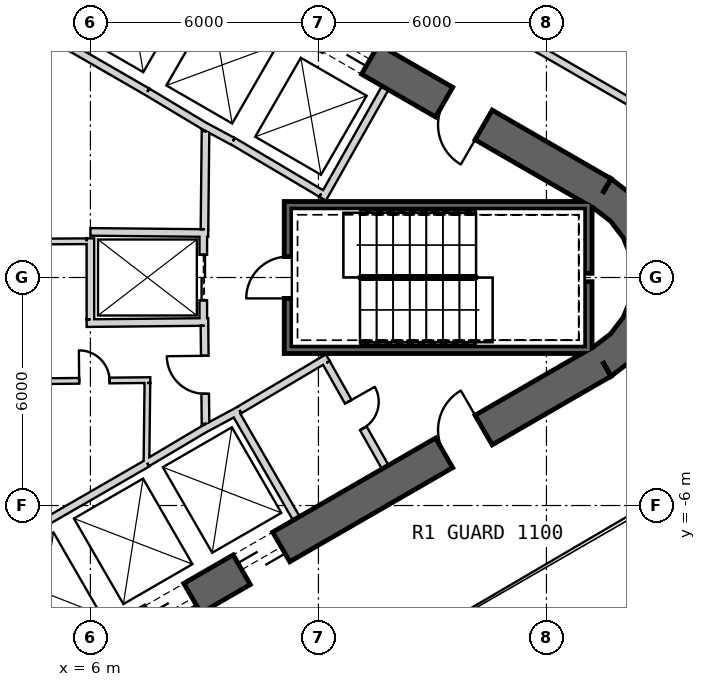
"""IFC4 building model, lengths in metres.
Left out: names, types, materials, properties, quantities, classifications, styles, units other than length and angle.
Written with IfcOpenShell. Run it as: python <this file> out.ifc"""

import sys

from ifc_helpers import new_model, si_unit, direction, frame, frame_2d, origin, place, context, subcontext, project, spatial, polyline, rectangle, outline, extrude, element, fill, save


model = new_model("IFC4")
c1 = context("Model", 3, precision=1e-05, world=origin(), true_north=direction((0.0, 1.0)))
c2 = subcontext(c1, "Body", "Model", "MODEL_VIEW")
j1 = project(units=[si_unit("LENGTHUNIT", "METRE"), si_unit("PLANEANGLEUNIT", "RADIAN")], contexts=[c1])
p1 = place(None, origin())
s1 = spatial("IfcSite", under=j1, at=p1, CompositionType="ELEMENT")
p2 = place(p1, origin())
s2 = spatial("IfcBuilding", under=s1, at=p2, CompositionType="ELEMENT")
p3 = place(p2, frame((0.0, 0.0, 15.5)))
s3 = spatial("IfcBuildingStorey", under=s2, at=p3, CompositionType="ELEMENT", Elevation=15.5)
p4 = place(p3, frame((19.475, 2.208, 0.0), z_axis=(0.0, 0.0, 1.0), x_axis=(-0.866028369851, 0.499994862586, 0.0)))
e1 = element("IfcWall", 1, at=p4, inside=s3, PredefinedType="SHEAR", context=c2, shape_type="SweptSolid", body=[
    extrude(rectangle(XDim=31.523, YDim=0.9, at=frame_2d((15.762, 0.0))), origin(), (0.0, 0.0, 1.0), 6.0),
])
p5 = place(p4, frame((7.062, 0.0, 0.0)))
e2 = element("IfcOpeningElement", 2, at=p5, cuts=e1, PredefinedType="OPENING", context=c2, shape_type="SweptSolid", body=[
    extrude(rectangle(XDim=1.2, YDim=2.4, at=frame_2d((0.6, 1.2))), frame((0.0, 0.46, 0.0), z_axis=(0.0, -1.0, 0.0), x_axis=(1.0, 0.0, 0.0)), (0.0, 0.0, 1.0), 0.92),
])
p6 = place(p4, frame((9.762, 0.0, 0.0)))
e3 = element("IfcOpeningElement", 3, at=p6, cuts=e1, PredefinedType="OPENING", context=c2, shape_type="SweptSolid", body=[
    extrude(rectangle(XDim=1.2, YDim=2.4, at=frame_2d((0.6, 1.2))), frame((0.0, 0.46, 0.0), z_axis=(0.0, -1.0, 0.0), x_axis=(1.0, 0.0, 0.0)), (0.0, 0.0, 1.0), 0.92),
])
p7 = place(p4, frame((12.462, 0.0, 0.0)))
e4 = element("IfcOpeningElement", 4, at=p7, cuts=e1, PredefinedType="OPENING", context=c2, shape_type="SweptSolid", body=[
    extrude(rectangle(XDim=1.2, YDim=2.4, at=frame_2d((0.6, 1.2))), frame((0.0, 0.46, 0.0), z_axis=(0.0, -1.0, 0.0), x_axis=(1.0, 0.0, 0.0)), (0.0, 0.0, 1.0), 0.92),
])
p8 = place(p4, frame((15.162, 0.0, 0.0)))
e5 = element("IfcOpeningElement", 5, at=p8, cuts=e1, PredefinedType="OPENING", context=c2, shape_type="SweptSolid", body=[
    extrude(rectangle(XDim=1.2, YDim=2.4, at=frame_2d((0.6, 1.2))), frame((0.0, 0.46, 0.0), z_axis=(0.0, -1.0, 0.0), x_axis=(1.0, 0.0, 0.0)), (0.0, 0.0, 1.0), 0.92),
])
p9 = place(p4, frame((17.862, 0.0, 0.0)))
e6 = element("IfcOpeningElement", 6, at=p9, cuts=e1, PredefinedType="OPENING", context=c2, shape_type="SweptSolid", body=[
    extrude(rectangle(XDim=1.2, YDim=2.4, at=frame_2d((0.6, 1.2))), frame((0.0, 0.46, 0.0), z_axis=(0.0, -1.0, 0.0), x_axis=(1.0, 0.0, 0.0)), (0.0, 0.0, 1.0), 0.92),
])
p10 = place(p4, frame((20.562, 0.0, 0.0)))
e7 = element("IfcOpeningElement", 7, at=p10, cuts=e1, PredefinedType="OPENING", context=c2, shape_type="SweptSolid", body=[
    extrude(rectangle(XDim=1.2, YDim=2.4, at=frame_2d((0.6, 1.2))), frame((0.0, 0.46, 0.0), z_axis=(0.0, -1.0, 0.0), x_axis=(1.0, 0.0, 0.0)), (0.0, 0.0, 1.0), 0.92),
])
p11 = place(p4, frame((23.262, 0.0, 0.0)))
e8 = element("IfcOpeningElement", 8, at=p11, cuts=e1, PredefinedType="OPENING", context=c2, shape_type="SweptSolid", body=[
    extrude(rectangle(XDim=1.2, YDim=2.4, at=frame_2d((0.6, 1.2))), frame((0.0, 0.46, 0.0), z_axis=(0.0, -1.0, 0.0), x_axis=(1.0, 0.0, 0.0)), (0.0, 0.0, 1.0), 0.92),
])
p12 = place(p4, frame((3.612, 0.0, 0.0)))
e9 = element("IfcOpeningElement", 9, at=p12, cuts=e1, PredefinedType="OPENING", context=c2, shape_type="SweptSolid", body=[
    extrude(rectangle(XDim=1.2, YDim=2.4, at=frame_2d((0.6, 1.2))), frame((0.0, 0.46, 0.0), z_axis=(0.0, -1.0, 0.0), x_axis=(1.0, 0.0, 0.0)), (0.0, 0.0, 1.0), 0.92),
])
p13 = place(p4, frame((26.712, 0.0, 0.0)))
e10 = element("IfcOpeningElement", 10, at=p13, cuts=e1, PredefinedType="OPENING", context=c2, shape_type="SweptSolid", body=[
    extrude(rectangle(XDim=1.2, YDim=2.4, at=frame_2d((0.6, 1.2))), frame((0.0, 0.46, 0.0), z_axis=(0.0, -1.0, 0.0), x_axis=(1.0, 0.0, 0.0)), (0.0, 0.0, 1.0), 0.92),
])
p14 = place(p3, frame((-7.825, -17.97, 0.0), z_axis=(0.0, 0.0, 1.0), x_axis=(0.866028369851, 0.499994862586, 0.0)))
e11 = element("IfcWall", 11, at=p14, inside=s3, PredefinedType="SHEAR", context=c2, shape_type="SweptSolid", body=[
    extrude(rectangle(XDim=31.523, YDim=0.9, at=frame_2d((15.762, 0.0))), origin(), (0.0, 0.0, 1.0), 6.0),
])
p15 = place(p14, frame((7.062, 0.0, 0.0)))
e12 = element("IfcOpeningElement", 12, at=p15, cuts=e11, PredefinedType="OPENING", context=c2, shape_type="SweptSolid", body=[
    extrude(rectangle(XDim=1.2, YDim=2.4, at=frame_2d((0.6, 1.2))), frame((0.0, 0.46, 0.0), z_axis=(0.0, -1.0, 0.0), x_axis=(1.0, 0.0, 0.0)), (0.0, 0.0, 1.0), 0.92),
])
p16 = place(p14, frame((9.762, 0.0, 0.0)))
e13 = element("IfcOpeningElement", 13, at=p16, cuts=e11, PredefinedType="OPENING", context=c2, shape_type="SweptSolid", body=[
    extrude(rectangle(XDim=1.2, YDim=2.4, at=frame_2d((0.6, 1.2))), frame((0.0, 0.46, 0.0), z_axis=(0.0, -1.0, 0.0), x_axis=(1.0, 0.0, 0.0)), (0.0, 0.0, 1.0), 0.92),
])
p17 = place(p14, frame((12.462, 0.0, 0.0)))
e14 = element("IfcOpeningElement", 14, at=p17, cuts=e11, PredefinedType="OPENING", context=c2, shape_type="SweptSolid", body=[
    extrude(rectangle(XDim=1.2, YDim=2.4, at=frame_2d((0.6, 1.2))), frame((0.0, 0.46, 0.0), z_axis=(0.0, -1.0, 0.0), x_axis=(1.0, 0.0, 0.0)), (0.0, 0.0, 1.0), 0.92),
])
p18 = place(p14, frame((15.162, 0.0, 0.0)))
e15 = element("IfcOpeningElement", 15, at=p18, cuts=e11, PredefinedType="OPENING", context=c2, shape_type="SweptSolid", body=[
    extrude(rectangle(XDim=1.2, YDim=2.4, at=frame_2d((0.6, 1.2))), frame((0.0, 0.46, 0.0), z_axis=(0.0, -1.0, 0.0), x_axis=(1.0, 0.0, 0.0)), (0.0, 0.0, 1.0), 0.92),
])
p19 = place(p14, frame((17.862, 0.0, 0.0)))
e16 = element("IfcOpeningElement", 16, at=p19, cuts=e11, PredefinedType="OPENING", context=c2, shape_type="SweptSolid", body=[
    extrude(rectangle(XDim=1.2, YDim=2.4, at=frame_2d((0.6, 1.2))), frame((0.0, 0.46, 0.0), z_axis=(0.0, -1.0, 0.0), x_axis=(1.0, 0.0, 0.0)), (0.0, 0.0, 1.0), 0.92),
])
p20 = place(p14, frame((20.562, 0.0, 0.0)))
e17 = element("IfcOpeningElement", 17, at=p20, cuts=e11, PredefinedType="OPENING", context=c2, shape_type="SweptSolid", body=[
    extrude(rectangle(XDim=1.2, YDim=2.4, at=frame_2d((0.6, 1.2))), frame((0.0, 0.46, 0.0), z_axis=(0.0, -1.0, 0.0), x_axis=(1.0, 0.0, 0.0)), (0.0, 0.0, 1.0), 0.92),
])
p21 = place(p14, frame((26.712, 0.0, 0.0)))
e18 = element("IfcOpeningElement", 18, at=p21, cuts=e11, PredefinedType="OPENING", context=c2, shape_type="SweptSolid", body=[
    extrude(rectangle(XDim=1.2, YDim=2.4, at=frame_2d((0.6, 1.2))), frame((0.0, 0.46, 0.0), z_axis=(0.0, -1.0, 0.0), x_axis=(1.0, 0.0, 0.0)), (0.0, 0.0, 1.0), 0.92),
])
p22 = place(p14, frame((3.612, 0.0, 0.0)))
e19 = element("IfcOpeningElement", 19, at=p22, cuts=e11, PredefinedType="OPENING", context=c2, shape_type="SweptSolid", body=[
    extrude(rectangle(XDim=1.2, YDim=2.4, at=frame_2d((0.6, 1.2))), frame((0.0, 0.46, 0.0), z_axis=(0.0, -1.0, 0.0), x_axis=(1.0, 0.0, 0.0)), (0.0, 0.0, 1.0), 0.92),
])
p23 = place(p3, origin())
e20 = element("IfcWall", 20, at=p23, inside=s3, PredefinedType="SHEAR", context=c2, shape_type="SweptSolid", body=[
    extrude(outline(polyline([(19.7, -2.598), (20.321, -2.121), (20.798, -1.5), (21.098, -0.777), (21.2, 0.0), (21.098, 0.777), (20.798, 1.5), (20.321, 2.121), (19.7, 2.598), (19.25, 1.819), (19.685, 1.485), (20.019, 1.05), (20.229, 0.543), (20.3, 0.0), (20.229, -0.543), (20.019, -1.05), (19.685, -1.485), (19.25, -1.819), (19.7, -2.598)])), origin(), (0.0, 0.0, 1.0), 6.0),
])
p24 = place(p3, frame((7.497, 4.886, 0.0), z_axis=(0.0, 0.0, 1.0), x_axis=(-0.866030989016, 0.499990325971, 0.0)))
e21 = element("IfcWall", 21, at=p24, inside=s3, PredefinedType="PLUMBINGWALL", context=c2, shape_type="SweptSolid", body=[
    extrude(rectangle(XDim=8.1, YDim=0.2, at=frame_2d((4.05, 0.0))), origin(), (0.0, 0.0, 1.0), 5.7),
])
p25 = place(p3, frame((12.11, 2.073, 0.0), z_axis=(0.0, 0.0, 1.0), x_axis=(0.49196600604, 0.870614408852, 0.0)))
e22 = element("IfcWall", 22, at=p25, inside=s3, PredefinedType="PLUMBINGWALL", context=c2, shape_type="SweptSolid", body=[
    extrude(rectangle(XDim=3.35, YDim=0.2, at=frame_2d((1.675, 0.0))), origin(), (0.0, 0.0, 1.0), 5.7),
])
p26 = place(p3, frame((12.073, 2.211, 0.0), z_axis=(0.0, 0.0, 1.0), x_axis=(-0.860438357912, 0.509554542943, 0.0)))
e23 = element("IfcWall", 23, at=p26, inside=s3, PredefinedType="PLUMBINGWALL", context=c2, shape_type="SweptSolid", body=[
    extrude(rectangle(XDim=2.7, YDim=0.2, at=frame_2d((1.35, 0.0))), origin(), (0.0, 0.0, 1.0), 5.7),
])
p27 = place(p3, frame((9.748, 3.583, 0.0), z_axis=(0.0, 0.0, 1.0), x_axis=(-0.880917147855, 0.473270513147, 0.0)))
e24 = element("IfcWall", 24, at=p27, inside=s3, PredefinedType="PLUMBINGWALL", context=c2, shape_type="SweptSolid", body=[
    extrude(rectangle(XDim=0.878, YDim=0.2, at=frame_2d((0.439, 0.0))), origin(), (0.0, 0.0, 1.0), 5.7),
])
p28 = place(p3, frame((9.079, 3.937, 0.0), z_axis=(0.0, 0.0, 1.0), x_axis=(-0.857516281273, 0.51445682749, 0.0)))
e25 = element("IfcWall", 25, at=p28, inside=s3, PredefinedType="PLUMBINGWALL", context=c2, shape_type="SweptSolid", body=[
    extrude(rectangle(XDim=1.845, YDim=0.2, at=frame_2d((0.922, 0.0))), origin(), (0.0, 0.0, 1.0), 5.7),
])
p29 = place(p3, frame((0.483, -8.936, 0.0), z_axis=(0.0, 0.0, 1.0), x_axis=(0.866030989016, 0.499990325971, 0.0)))
e26 = element("IfcWall", 26, at=p29, inside=s3, PredefinedType="PLUMBINGWALL", context=c2, shape_type="SweptSolid", body=[
    extrude(rectangle(XDim=8.1, YDim=0.2, at=frame_2d((4.05, 0.0))), origin(), (0.0, 0.0, 1.0), 5.7),
])
p30 = place(p3, frame((9.795, -3.525, 0.0), z_axis=(0.0, 0.0, 1.0), x_axis=(0.499984717929, -0.866034226713, 0.0)))
e27 = element("IfcWall", 27, at=p30, inside=s3, PredefinedType="PLUMBINGWALL", context=c2, shape_type="SweptSolid", body=[
    extrude(rectangle(XDim=3.25, YDim=0.2, at=frame_2d((1.625, 0.0))), origin(), (0.0, 0.0, 1.0), 5.7),
])
p31 = place(p3, frame((8.974, -3.999, 0.0), z_axis=(0.0, 0.0, 1.0), x_axis=(0.880907015104, 0.473289373154, 0.0)))
e28 = element("IfcWall", 28, at=p31, inside=s3, PredefinedType="PLUMBINGWALL", context=c2, shape_type="SweptSolid", body=[
    extrude(rectangle(XDim=1.078, YDim=0.2, at=frame_2d((0.539, 0.0))), origin(), (0.0, 0.0, 1.0), 5.7),
])
p32 = place(p3, frame((7.493, -4.878, 0.0), z_axis=(0.0, 0.0, 1.0), x_axis=(0.859981807212, 0.510324691999, 0.0)))
e29 = element("IfcWall", 29, at=p32, inside=s3, PredefinedType="PLUMBINGWALL", context=c2, shape_type="SweptSolid", body=[
    extrude(rectangle(XDim=1.845, YDim=0.2, at=frame_2d((0.922, 0.0))), origin(), (0.0, 0.0, 1.0), 5.7),
])
p33 = place(p3, frame((19.2, 1.9, -0.3), z_axis=(0.0, 0.0, 1.0), x_axis=(-1.0, 0.0, 0.0)))
e30 = element("IfcWall", 30, at=p33, inside=s3, PredefinedType="SHEAR", context=c2, shape_type="SweptSolid", body=[
    extrude(rectangle(XDim=8.1, YDim=0.2, at=frame_2d((4.05, 0.0))), origin(), (0.0, 0.0, 1.0), 6.0),
])
p34 = place(p3, frame((19.1, -2.0, -0.3), z_axis=(0.0, 0.0, 1.0), x_axis=(0.0, 1.0, 0.0)))
e31 = element("IfcWall", 31, at=p34, inside=s3, PredefinedType="SHEAR", context=c2, shape_type="SweptSolid", body=[
    extrude(rectangle(XDim=1.89, YDim=0.2, at=frame_2d((0.945, 0.0))), origin(), (0.0, 0.0, 1.0), 6.0),
])
p35 = place(p3, frame((19.1, 0.11, -0.3), z_axis=(0.0, 0.0, 1.0), x_axis=(0.0, 1.0, 0.0)))
e32 = element("IfcWall", 32, at=p35, inside=s3, PredefinedType="SHEAR", context=c2, shape_type="SweptSolid", body=[
    extrude(rectangle(XDim=1.69, YDim=0.2, at=frame_2d((0.845, 0.0))), origin(), (0.0, 0.0, 1.0), 6.0),
])
p36 = place(p3, frame((11.1, -1.9, -0.3), z_axis=(0.0, 0.0, 1.0), x_axis=(1.0, 0.0, 0.0)))
e33 = element("IfcWall", 33, at=p36, inside=s3, PredefinedType="SHEAR", context=c2, shape_type="SweptSolid", body=[
    extrude(rectangle(XDim=7.9, YDim=0.2, at=frame_2d((3.95, 0.0))), origin(), (0.0, 0.0, 1.0), 6.0),
])
p37 = place(p3, frame((11.2, -1.8, -0.3), z_axis=(0.0, 0.0, 1.0), x_axis=(0.0, 1.0, 0.0)))
e34 = element("IfcWall", 34, at=p37, inside=s3, PredefinedType="SHEAR", context=c2, shape_type="SweptSolid", body=[
    extrude(rectangle(XDim=3.6, YDim=0.2, at=frame_2d((1.8, 0.0))), origin(), (0.0, 0.0, 1.0), 6.0),
])
p38 = place(p37, frame((1.25, 0.0, 0.3)))
e35 = element("IfcOpeningElement", 35, at=p38, cuts=e34, PredefinedType="OPENING", context=c2, shape_type="SweptSolid", body=[
    extrude(rectangle(XDim=1.1, YDim=2.1, at=frame_2d((0.55, 1.05))), frame((0.0, 0.11, 0.0), z_axis=(0.0, -1.0, 0.0), x_axis=(1.0, 0.0, 0.0)), (0.0, 0.0, 1.0), 0.22),
])
p39 = place(p3, frame((8.97, 1.2, 0.0), z_axis=(0.0, 0.0, 1.0), x_axis=(0.0, -1.0, 0.0)))
e36 = element("IfcWall", 36, at=p39, inside=s3, PredefinedType="PLUMBINGWALL", context=c2, shape_type="SweptSolid", body=[
    extrude(rectangle(XDim=2.4, YDim=0.2, at=frame_2d((1.2, 0.0))), origin(), (0.0, 0.0, 1.0), 5.7),
])
p40 = place(p39, frame((0.6, 0.0, 0.0)))
e37 = element("IfcOpeningElement", 37, at=p40, cuts=e36, PredefinedType="OPENING", context=c2, shape_type="SweptSolid", body=[
    extrude(rectangle(XDim=1.2, YDim=2.4, at=frame_2d((0.6, 1.2))), frame((0.0, 0.11, 0.0), z_axis=(0.0, -1.0, 0.0), x_axis=(1.0, 0.0, 0.0)), (0.0, 0.0, 1.0), 0.22),
])
p41 = place(p3, frame((6.0, 1.2, 0.0), z_axis=(0.0, 0.0, 1.0), x_axis=(0.999949988, -0.010001074852, 0.0)))
e38 = element("IfcWall", 38, at=p41, inside=s3, PredefinedType="PLUMBINGWALL", context=c2, shape_type="SweptSolid", body=[
    extrude(rectangle(XDim=3.1, YDim=0.2, at=frame_2d((1.55, 0.0))), origin(), (0.0, 0.0, 1.0), 5.7),
])
p42 = place(p3, frame((5.9, -1.201, 0.0), z_axis=(0.0, 0.0, 1.0), x_axis=(0.999950064753, 0.009993397809, 0.0)))
e39 = element("IfcWall", 39, at=p42, inside=s3, PredefinedType="PLUMBINGWALL", context=c2, shape_type="SweptSolid", body=[
    extrude(rectangle(XDim=3.2, YDim=0.2, at=frame_2d((1.6, 0.0))), origin(), (0.0, 0.0, 1.0), 5.7),
])
p43 = place(p3, frame((6.0, -1.1, 0.0), z_axis=(0.0, 0.0, 1.0), x_axis=(0.0, 1.0, 0.0)))
e40 = element("IfcWall", 40, at=p43, inside=s3, PredefinedType="PLUMBINGWALL", context=c2, shape_type="SweptSolid", body=[
    extrude(rectangle(XDim=2.13, YDim=0.2, at=frame_2d((1.065, 0.0))), origin(), (0.0, 0.0, 1.0), 5.7),
])
p44 = place(p3, frame((12.245, -2.109, 0.0), z_axis=(0.0, 0.0, 1.0), x_axis=(-0.860414880418, -0.509594185166, 0.0)))
e41 = element("IfcWall", 41, at=p44, inside=s3, PredefinedType="PARTITIONING", context=c2, shape_type="SweptSolid", body=[
    extrude(rectangle(XDim=2.7, YDim=0.2, at=frame_2d((1.35, 0.0))), origin(), (0.0, 0.0, 1.0), 5.7),
])
p45 = place(p3, frame((13.758, -4.99, 0.0), z_axis=(0.0, 0.0, 1.0), x_axis=(-0.491993409184, 0.87059892334, 0.0)))
e42 = element("IfcWall", 42, at=p45, inside=s3, PredefinedType="PARTITIONING", context=c2, shape_type="SweptSolid", body=[
    extrude(rectangle(XDim=3.15, YDim=0.2, at=frame_2d((1.575, 0.0))), origin(), (0.0, 0.0, 1.0), 5.7),
])
p46 = place(p45, frame((1.175, 0.0, 0.0)))
e43 = element("IfcOpeningElement", 43, at=p46, cuts=e42, PredefinedType="OPENING", context=c2, shape_type="SweptSolid", body=[
    extrude(rectangle(XDim=0.8, YDim=2.1, at=frame_2d((0.4, 1.05))), frame((0.0, 0.11, 0.0), z_axis=(0.0, -1.0, 0.0), x_axis=(1.0, 0.0, 0.0)), (0.0, 0.0, 1.0), 0.22),
])
p47 = place(p3, frame((9.001, 1.27, 0.0), z_axis=(0.0, 0.0, 1.0), x_axis=(0.010784614026, 0.999941844359, 0.0)))
e44 = element("IfcWall", 44, at=p47, inside=s3, PredefinedType="PARTITIONING", context=c2, shape_type="SweptSolid", body=[
    extrude(rectangle(XDim=2.581, YDim=0.2, at=frame_2d((1.291, 0.0))), origin(), (0.0, 0.0, 1.0), 5.7),
])
p48 = place(p3, frame((9.029, -3.851, 0.0), z_axis=(0.0, 0.0, 1.0), x_axis=(-0.010783593937, 0.99994185536, 0.0)))
e45 = element("IfcWall", 45, at=p48, inside=s3, PredefinedType="PARTITIONING", context=c2, shape_type="SweptSolid", body=[
    extrude(rectangle(XDim=2.581, YDim=0.2, at=frame_2d((1.291, 0.0))), origin(), (0.0, 0.0, 1.0), 5.7),
])
p49 = place(p48, frame((0.791, 0.0, 0.0)))
e46 = element("IfcOpeningElement", 46, at=p49, cuts=e45, PredefinedType="OPENING", context=c2, shape_type="SweptSolid", body=[
    extrude(rectangle(XDim=1.0, YDim=2.1, at=frame_2d((0.5, 1.05))), frame((0.0, 0.11, 0.0), z_axis=(0.0, -1.0, 0.0), x_axis=(1.0, 0.0, 0.0)), (0.0, 0.0, 1.0), 0.22),
])
p50 = place(p3, frame((1.214, 0.924, 0.0), z_axis=(0.0, 0.0, 1.0), x_axis=(0.999979796062, 0.006356686907, 0.0)))
e47 = element("IfcWall", 47, at=p50, inside=s3, PredefinedType="PLUMBINGWALL", context=c2, shape_type="SweptSolid", body=[
    extrude(rectangle(XDim=4.686, YDim=0.15, at=frame_2d((2.343, 0.0))), origin(), (0.0, 0.0, 1.0), 5.7),
])
p51 = place(p50, frame((2.007, 0.0, 0.0)))
e48 = element("IfcOpeningElement", 48, at=p51, cuts=e47, PredefinedType="OPENING", context=c2, shape_type="SweptSolid", body=[
    extrude(rectangle(XDim=0.8, YDim=2.1, at=frame_2d((0.4, 1.05))), frame((0.0, 0.085, 0.0), z_axis=(0.0, -1.0, 0.0), x_axis=(1.0, 0.0, 0.0)), (0.0, 0.0, 1.0), 0.17),
])
p52 = place(p3, frame((7.575, -2.699, 0.0), z_axis=(0.0, 0.0, 1.0), x_axis=(-0.999947791603, -0.010218320275, 0.0)))
e49 = element("IfcWall", 49, at=p52, inside=s3, PredefinedType="PLUMBINGWALL", context=c2, shape_type="SweptSolid", body=[
    extrude(rectangle(XDim=2.867, YDim=0.15, at=frame_2d((1.434, 0.0))), origin(), (0.0, 0.0, 1.0), 5.7),
])
p53 = place(p52, frame((1.071, 0.0, 0.0)))
e50 = element("IfcOpeningElement", 50, at=p53, cuts=e49, PredefinedType="OPENING", context=c2, shape_type="SweptSolid", body=[
    extrude(rectangle(XDim=0.8, YDim=2.1, at=frame_2d((0.4, 1.05))), frame((0.0, 0.085, 0.0), z_axis=(0.0, -1.0, 0.0), x_axis=(1.0, 0.0, 0.0)), (0.0, 0.0, 1.0), 0.17),
])
p54 = place(p3, frame((7.475, -4.865, 0.0), z_axis=(0.0, 0.0, 1.0), x_axis=(0.011682810534, 0.99993175364, 0.0)))
e51 = element("IfcWall", 51, at=p54, inside=s3, PredefinedType="PLUMBINGWALL", context=c2, shape_type="SweptSolid", body=[
    extrude(rectangle(XDim=2.09, YDim=0.15, at=frame_2d((1.045, 0.0))), origin(), (0.0, 0.0, 1.0), 5.7),
])
p55 = place(p3, frame((21.161, 4.064, 0.0), z_axis=(0.0, 0.0, 1.0), x_axis=(-0.865947440868, 0.500135011425, 0.0)))
e52 = element("IfcWall", 52, at=p55, inside=s3, PredefinedType="PARTITIONING", context=c2, shape_type="SweptSolid", body=[
    extrude(rectangle(XDim=4.593, YDim=0.2, at=frame_2d((2.296, 0.0))), origin(), (0.0, 0.0, 1.0), 4.88),
])
p56 = place(p38, origin())
e53 = element("IfcDoor", 53, at=p56, inside=s3, OperationType="SINGLE_SWING_LEFT", PredefinedType="USERDEFINED", context=c2, shape_type="SweptSolid", body=[
    extrude(rectangle(XDim=1.1, YDim=2.1, at=frame_2d((0.55, 1.05))), frame((0.0, 0.025, 0.0), z_axis=(0.0, -1.0, 0.0), x_axis=(1.0, 0.0, 0.0)), (0.0, 0.0, 1.0), 0.05),
])
fill(e35, e53)
p57 = place(p49, origin())
e54 = element("IfcDoor", 54, at=p57, inside=s3, OperationType="SINGLE_SWING_RIGHT", PredefinedType="USERDEFINED", context=c2, shape_type="SweptSolid", body=[
    extrude(rectangle(XDim=1.0, YDim=2.1, at=frame_2d((0.5, 1.05))), frame((0.0, 0.025, 0.0), z_axis=(0.0, -1.0, 0.0), x_axis=(1.0, 0.0, 0.0)), (0.0, 0.0, 1.0), 0.05),
])
fill(e46, e54)
p58 = place(p40, origin())
e55 = element("IfcDoor", 55, at=p58, inside=s3, OperationType="SLIDING_TO_LEFT", PredefinedType="USERDEFINED", context=c2, shape_type="SweptSolid", body=[
    extrude(rectangle(XDim=1.2, YDim=2.4, at=frame_2d((0.6, 1.2))), frame((0.0, 0.025, 0.0), z_axis=(0.0, -1.0, 0.0), x_axis=(1.0, 0.0, 0.0)), (0.0, 0.0, 1.0), 0.05),
])
fill(e37, e55)
p59 = place(p53, origin())
e56 = element("IfcDoor", 56, at=p59, inside=s3, OperationType="SINGLE_SWING_RIGHT", PredefinedType="USERDEFINED", context=c2, shape_type="SweptSolid", body=[
    extrude(rectangle(XDim=0.8, YDim=2.1, at=frame_2d((0.4, 1.05))), frame((0.0, 0.025, 0.0), z_axis=(0.0, -1.0, 0.0), x_axis=(1.0, 0.0, 0.0)), (0.0, 0.0, 1.0), 0.05),
])
fill(e50, e56)
p60 = place(p46, origin())
e57 = element("IfcDoor", 57, at=p60, inside=s3, OperationType="SINGLE_SWING_RIGHT", PredefinedType="USERDEFINED", context=c2, shape_type="SweptSolid", body=[
    extrude(rectangle(XDim=0.8, YDim=2.1, at=frame_2d((0.4, 1.05))), frame((0.0, 0.025, 0.0), z_axis=(0.0, -1.0, 0.0), x_axis=(1.0, 0.0, 0.0)), (0.0, 0.0, 1.0), 0.05),
])
fill(e43, e57)
p61 = place(p5, origin())
e58 = element("IfcDoor", 58, at=p61, inside=s3, OperationType="SLIDING_TO_LEFT", PredefinedType="USERDEFINED", context=c2, shape_type="SweptSolid", body=[
    extrude(rectangle(XDim=1.2, YDim=2.4, at=frame_2d((0.6, 1.2))), frame((0.0, 0.025, 0.0), z_axis=(0.0, -1.0, 0.0), x_axis=(1.0, 0.0, 0.0)), (0.0, 0.0, 1.0), 0.05),
])
fill(e2, e58)
p62 = place(p19, origin())
e59 = element("IfcDoor", 59, at=p62, inside=s3, OperationType="SLIDING_TO_LEFT", PredefinedType="USERDEFINED", context=c2, shape_type="SweptSolid", body=[
    extrude(rectangle(XDim=1.2, YDim=2.4, at=frame_2d((0.6, 1.2))), frame((0.0, 0.025, 0.0), z_axis=(0.0, -1.0, 0.0), x_axis=(1.0, 0.0, 0.0)), (0.0, 0.0, 1.0), 0.05),
])
fill(e16, e59)
p63 = place(p20, origin())
e60 = element("IfcDoor", 60, at=p63, inside=s3, OperationType="SLIDING_TO_LEFT", PredefinedType="USERDEFINED", context=c2, shape_type="SweptSolid", body=[
    extrude(rectangle(XDim=1.2, YDim=2.4, at=frame_2d((0.6, 1.2))), frame((0.0, 0.025, 0.0), z_axis=(0.0, -1.0, 0.0), x_axis=(1.0, 0.0, 0.0)), (0.0, 0.0, 1.0), 0.05),
])
fill(e17, e60)
p64 = place(p21, origin())
e61 = element("IfcDoor", 61, at=p64, inside=s3, OperationType="SINGLE_SWING_RIGHT", PredefinedType="USERDEFINED", context=c2, shape_type="SweptSolid", body=[
    extrude(rectangle(XDim=1.2, YDim=2.4, at=frame_2d((0.6, 1.2))), frame((0.0, 0.025, 0.0), z_axis=(0.0, -1.0, 0.0), x_axis=(1.0, 0.0, 0.0)), (0.0, 0.0, 1.0), 0.05),
])
fill(e18, e61)
p65 = place(p12, origin())
e62 = element("IfcDoor", 62, at=p65, inside=s3, OperationType="SINGLE_SWING_LEFT", PredefinedType="USERDEFINED", context=c2, shape_type="SweptSolid", body=[
    extrude(rectangle(XDim=1.2, YDim=2.4, at=frame_2d((0.6, 1.2))), frame((0.0, 0.025, 0.0), z_axis=(0.0, -1.0, 0.0), x_axis=(1.0, 0.0, 0.0)), (0.0, 0.0, 1.0), 0.05),
])
fill(e9, e62)
save(model, sys.argv[1])
